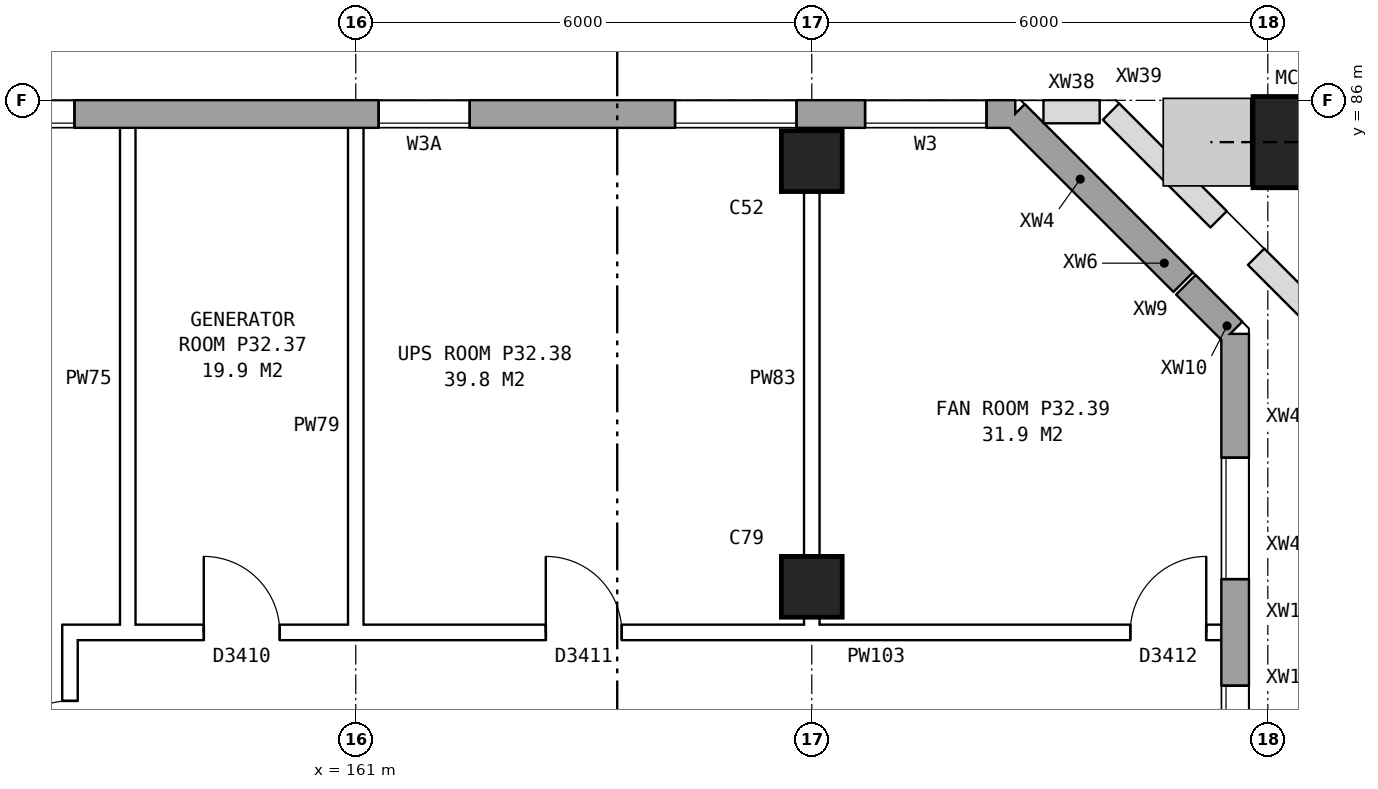
"""IFC4 building model, lengths in metres.
Left out: names, types, materials, properties, quantities, classifications, styles, units other than length and angle.
Written with IfcOpenShell. Run it as: python <this file> out.ifc"""

import sys

from ifc_helpers import new_model, si_unit, direction, frame, frame_2d, origin, origin_2d, place, context, subcontext, project, spatial, rectangle, hollow_rectangle, extrude, element, fill, save


model = new_model("IFC4")
c1 = context("Model", 3, precision=1e-05, world=origin(), true_north=direction((0.0, 1.0)))
c2 = subcontext(c1, "Body", "Model", "MODEL_VIEW")
j1 = project(units=[si_unit("LENGTHUNIT", "METRE"), si_unit("PLANEANGLEUNIT", "RADIAN")], contexts=[c1])
p1 = place(None, origin())
s1 = spatial("IfcSite", under=j1, at=p1, CompositionType="ELEMENT")
p2 = place(p1, origin())
s2 = spatial("IfcBuilding", under=s1, at=p2, CompositionType="ELEMENT")
p3 = place(p2, frame((0.0, 0.0, 115.0)))
s3 = spatial("IfcBuildingStorey", under=s2, at=p3, CompositionType="ELEMENT", Elevation=115.0)
for number, where, z_axis, x_axis in (
    (1, (167.0, 79.6, 0.0), (0.0, 0.0, 1.0), (1.0, 0.0, 0.0)),
    (2, (167.0, 85.2, 0.0), (0.0, 0.0, 1.0), (1.0, 0.0, 0.0)),
):
    element("IfcColumn", number, at=place(p3, frame(where, z_axis=z_axis, x_axis=x_axis)), inside=s3, PredefinedType="COLUMN", context=c2, shape_type="SweptSolid", body=[
        extrude(rectangle(XDim=0.8, YDim=0.8, at=origin_2d()), origin(), (0.0, 0.0, 1.0), 4.2),
    ])
p4 = place(p3, frame((173.406, 85.45, 0.161), z_axis=(-0.267672897269, 0.0, 0.963509844302), x_axis=(0.0, -1.0, 0.0)))
e3 = element("IfcColumn", 3, at=p4, inside=s3, PredefinedType="COLUMN", context=c2, shape_type="SweptSolid", body=[
    extrude(hollow_rectangle(XDim=1.2, YDim=1.2, WallThickness=0.065, at=origin_2d()), origin(), (0.0, 0.0, 1.0), 4.337),
])
p5 = place(p3, frame((172.57, 57.075, 0.0), z_axis=(0.0, 0.0, 1.0), x_axis=(0.0, 1.0, 0.0)))
e4 = element("IfcWall", 4, at=p5, inside=s3, PredefinedType="STANDARD", context=c2, shape_type="SweptSolid", body=[
    extrude(rectangle(XDim=25.851, YDim=0.36, at=frame_2d((12.925, 0.0))), origin(), (0.0, 0.0, 1.0), 4.2),
])
p6 = place(p5, frame((2.6, 0.0, 1.5)))
e5 = element("IfcOpeningElement", 5, at=p6, cuts=e4, PredefinedType="OPENING", context=c2, shape_type="SweptSolid", body=[
    extrude(rectangle(XDim=0.9, YDim=1.2, at=frame_2d((0.45, 0.6))), frame((0.0, 0.19, 0.0), z_axis=(0.0, -1.0, 0.0), x_axis=(1.0, 0.0, 0.0)), (0.0, 0.0, 1.0), 0.38),
])
p7 = place(p5, frame((3.925, 0.0, 1.5)))
e6 = element("IfcOpeningElement", 6, at=p7, cuts=e4, PredefinedType="OPENING", context=c2, shape_type="SweptSolid", body=[
    extrude(rectangle(XDim=0.6, YDim=1.2, at=frame_2d((0.3, 0.6))), frame((0.0, 0.19, 0.0), z_axis=(0.0, -1.0, 0.0), x_axis=(1.0, 0.0, 0.0)), (0.0, 0.0, 1.0), 0.38),
])
p8 = place(p5, frame((7.625, 0.0, 1.5)))
e7 = element("IfcOpeningElement", 7, at=p8, cuts=e4, PredefinedType="OPENING", context=c2, shape_type="SweptSolid", body=[
    extrude(rectangle(XDim=1.6, YDim=1.2, at=frame_2d((0.8, 0.6))), frame((0.0, 0.19, 0.0), z_axis=(0.0, -1.0, 0.0), x_axis=(1.0, 0.0, 0.0)), (0.0, 0.0, 1.0), 0.38),
])
p9 = place(p5, frame((10.625, 0.0, 1.5)))
e8 = element("IfcOpeningElement", 8, at=p9, cuts=e4, PredefinedType="OPENING", context=c2, shape_type="SweptSolid", body=[
    extrude(rectangle(XDim=1.6, YDim=1.2, at=frame_2d((0.8, 0.6))), frame((0.0, 0.19, 0.0), z_axis=(0.0, -1.0, 0.0), x_axis=(1.0, 0.0, 0.0)), (0.0, 0.0, 1.0), 0.38),
])
p10 = place(p5, frame((9.525, 0.0, 1.5)))
e9 = element("IfcOpeningElement", 9, at=p10, cuts=e4, PredefinedType="OPENING", context=c2, shape_type="SweptSolid", body=[
    extrude(rectangle(XDim=0.6, YDim=1.2, at=frame_2d((0.3, 0.6))), frame((0.0, 0.19, 0.0), z_axis=(0.0, -1.0, 0.0), x_axis=(1.0, 0.0, 0.0)), (0.0, 0.0, 1.0), 0.38),
])
p11 = place(p5, frame((14.975, 0.0, 1.5)))
e10 = element("IfcOpeningElement", 10, at=p11, cuts=e4, PredefinedType="OPENING", context=c2, shape_type="SweptSolid", body=[
    extrude(rectangle(XDim=0.6, YDim=1.2, at=frame_2d((0.3, 0.6))), frame((0.0, 0.19, 0.0), z_axis=(0.0, -1.0, 0.0), x_axis=(1.0, 0.0, 0.0)), (0.0, 0.0, 1.0), 0.38),
])
p12 = place(p5, frame((19.625, 0.0, 1.5)))
e11 = element("IfcOpeningElement", 11, at=p12, cuts=e4, PredefinedType="OPENING", context=c2, shape_type="SweptSolid", body=[
    extrude(rectangle(XDim=1.6, YDim=1.2, at=frame_2d((0.8, 0.6))), frame((0.0, 0.19, 0.0), z_axis=(0.0, -1.0, 0.0), x_axis=(1.0, 0.0, 0.0)), (0.0, 0.0, 1.0), 0.38),
])
p13 = place(p5, frame((22.625, 0.0, 1.5)))
e12 = element("IfcOpeningElement", 12, at=p13, cuts=e4, PredefinedType="OPENING", context=c2, shape_type="SweptSolid", body=[
    extrude(rectangle(XDim=1.6, YDim=1.2, at=frame_2d((0.8, 0.6))), frame((0.0, 0.19, 0.0), z_axis=(0.0, -1.0, 0.0), x_axis=(1.0, 0.0, 0.0)), (0.0, 0.0, 1.0), 0.38),
])
p14 = place(p5, frame((15.875, 0.0, 1.5)))
e13 = element("IfcOpeningElement", 13, at=p14, cuts=e4, PredefinedType="OPENING", context=c2, shape_type="SweptSolid", body=[
    extrude(rectangle(XDim=1.2, YDim=1.2, at=frame_2d((0.6, 0.6))), frame((0.0, 0.19, 0.0), z_axis=(0.0, -1.0, 0.0), x_axis=(1.0, 0.0, 0.0)), (0.0, 0.0, 1.0), 0.38),
])
p15 = place(p3, frame((172.535, 82.961, 0.0), z_axis=(0.0, 0.0, 1.0), x_axis=(-0.706503705369, 0.707709343092, 0.0)))
e14 = element("IfcWall", 14, at=p15, inside=s3, PredefinedType="STANDARD", context=c2, shape_type="SweptSolid", body=[
    extrude(rectangle(XDim=0.202, YDim=0.36, at=frame_2d((0.101, 0.0))), origin(), (0.0, 0.0, 1.0), 4.2),
])
p16 = place(p3, frame((172.392, 83.104, 0.953), z_axis=(0.0, 0.0, 1.0), x_axis=(-0.707291043531, 0.706922470814, 0.0)))
e15 = element("IfcWall", 15, at=p16, inside=s3, PredefinedType="STANDARD", context=c2, shape_type="SweptSolid", body=[
    extrude(rectangle(XDim=0.662, YDim=0.36, at=frame_2d((0.331, 0.0))), origin(), (0.0, 0.0, 1.0), 3.247),
])
p17 = place(p3, frame((171.886, 83.609, 0.0), z_axis=(0.0, 0.0, 1.0), x_axis=(-0.707106781187, 0.707106781187, 0.0)))
e16 = element("IfcWall", 16, at=p17, inside=s3, PredefinedType="STANDARD", context=c2, shape_type="SweptSolid", body=[
    extrude(rectangle(XDim=0.703, YDim=0.36, at=frame_2d((0.351, 0.0))), origin(), (0.0, 0.0, 1.0), 3.397),
])
p18 = place(p3, frame((171.389, 84.106, 0.0), z_axis=(0.0, 0.0, 1.0), x_axis=(-0.707106781187, 0.707106781187, 0.0)))
e17 = element("IfcWall", 17, at=p18, inside=s3, PredefinedType="STANDARD", context=c2, shape_type="SweptSolid", body=[
    extrude(rectangle(XDim=2.424, YDim=0.36, at=frame_2d((1.212, 0.0))), origin(), (0.0, 0.0, 1.0), 4.2),
])
p19 = place(p3, frame((169.675, 85.82, 0.0), z_axis=(0.0, 0.0, 1.0), x_axis=(-1.0, 0.0, 0.0)))
e18 = element("IfcWall", 18, at=p19, inside=s3, PredefinedType="STANDARD", context=c2, shape_type="SweptSolid", body=[
    extrude(rectangle(XDim=35.601, YDim=0.36, at=frame_2d((17.8, 0.0))), origin(), (0.0, 0.0, 1.0), 4.2),
])
p20 = place(p19, frame((0.375, 0.0, 1.5)))
e19 = element("IfcOpeningElement", 19, at=p20, cuts=e18, PredefinedType="OPENING", context=c2, shape_type="SweptSolid", body=[
    extrude(rectangle(XDim=1.6, YDim=1.2, at=frame_2d((0.8, 0.6))), frame((0.0, 0.19, 0.0), z_axis=(0.0, -1.0, 0.0), x_axis=(1.0, 0.0, 0.0)), (0.0, 0.0, 1.0), 0.38),
])
p21 = place(p19, frame((2.875, 0.0, 1.5)))
e20 = element("IfcOpeningElement", 20, at=p21, cuts=e18, PredefinedType="OPENING", context=c2, shape_type="SweptSolid", body=[
    extrude(rectangle(XDim=1.6, YDim=1.2, at=frame_2d((0.8, 0.6))), frame((0.0, 0.19, 0.0), z_axis=(0.0, -1.0, 0.0), x_axis=(1.0, 0.0, 0.0)), (0.0, 0.0, 1.0), 0.38),
])
p22 = place(p19, frame((7.175, 0.0, 1.5)))
e21 = element("IfcOpeningElement", 21, at=p22, cuts=e18, PredefinedType="OPENING", context=c2, shape_type="SweptSolid", body=[
    extrude(rectangle(XDim=1.2, YDim=1.2, at=frame_2d((0.6, 0.6))), frame((0.0, 0.19, 0.0), z_axis=(0.0, -1.0, 0.0), x_axis=(1.0, 0.0, 0.0)), (0.0, 0.0, 1.0), 0.38),
])
p23 = place(p19, frame((12.375, 0.0, 1.5)))
e22 = element("IfcOpeningElement", 22, at=p23, cuts=e18, PredefinedType="OPENING", context=c2, shape_type="SweptSolid", body=[
    extrude(rectangle(XDim=1.6, YDim=1.2, at=frame_2d((0.8, 0.6))), frame((0.0, 0.19, 0.0), z_axis=(0.0, -1.0, 0.0), x_axis=(1.0, 0.0, 0.0)), (0.0, 0.0, 1.0), 0.38),
])
p24 = place(p19, frame((14.275, 0.0, 1.5)))
e23 = element("IfcOpeningElement", 23, at=p24, cuts=e18, PredefinedType="OPENING", context=c2, shape_type="SweptSolid", body=[
    extrude(rectangle(XDim=0.6, YDim=1.2, at=frame_2d((0.3, 0.6))), frame((0.0, 0.19, 0.0), z_axis=(0.0, -1.0, 0.0), x_axis=(1.0, 0.0, 0.0)), (0.0, 0.0, 1.0), 0.38),
])
p25 = place(p19, frame((15.175, 0.0, 1.5)))
e24 = element("IfcOpeningElement", 24, at=p25, cuts=e18, PredefinedType="OPENING", context=c2, shape_type="SweptSolid", body=[
    extrude(rectangle(XDim=1.2, YDim=1.2, at=frame_2d((0.6, 0.6))), frame((0.0, 0.19, 0.0), z_axis=(0.0, -1.0, 0.0), x_axis=(1.0, 0.0, 0.0)), (0.0, 0.0, 1.0), 0.38),
])
p26 = place(p19, frame((24.375, 0.0, 1.5)))
e25 = element("IfcOpeningElement", 25, at=p26, cuts=e18, PredefinedType="OPENING", context=c2, shape_type="SweptSolid", body=[
    extrude(rectangle(XDim=1.6, YDim=1.2, at=frame_2d((0.8, 0.6))), frame((0.0, 0.19, 0.0), z_axis=(0.0, -1.0, 0.0), x_axis=(1.0, 0.0, 0.0)), (0.0, 0.0, 1.0), 0.38),
])
p27 = place(p19, frame((26.875, 0.0, 1.5)))
e26 = element("IfcOpeningElement", 26, at=p27, cuts=e18, PredefinedType="OPENING", context=c2, shape_type="SweptSolid", body=[
    extrude(rectangle(XDim=1.2, YDim=1.2, at=frame_2d((0.6, 0.6))), frame((0.0, 0.19, 0.0), z_axis=(0.0, -1.0, 0.0), x_axis=(1.0, 0.0, 0.0)), (0.0, 0.0, 1.0), 0.38),
])
p28 = place(p19, frame((31.075, 0.0, 1.5)))
e27 = element("IfcOpeningElement", 27, at=p28, cuts=e18, PredefinedType="OPENING", context=c2, shape_type="SweptSolid", body=[
    extrude(rectangle(XDim=1.2, YDim=1.2, at=frame_2d((0.6, 0.6))), frame((0.0, 0.19, 0.0), z_axis=(0.0, -1.0, 0.0), x_axis=(1.0, 0.0, 0.0)), (0.0, 0.0, 1.0), 0.38),
])
p29 = place(p19, frame((19.125, 0.0, 1.5)))
e28 = element("IfcOpeningElement", 28, at=p29, cuts=e18, PredefinedType="OPENING", context=c2, shape_type="SweptSolid", body=[
    extrude(rectangle(XDim=1.2, YDim=1.2, at=frame_2d((0.6, 0.6))), frame((0.0, 0.19, 0.0), z_axis=(0.0, -1.0, 0.0), x_axis=(1.0, 0.0, 0.0)), (0.0, 0.0, 1.0), 0.38),
])
p30 = place(p3, frame((173.742, 83.045, 0.0), z_axis=(0.0, 0.0, 1.0), x_axis=(-0.707010372874, 0.707203176357, 0.0)))
e29 = element("IfcWall", 29, at=p30, inside=s3, PredefinedType="PARAPET", context=c2, shape_type="SweptSolid", body=[
    extrude(rectangle(XDim=1.266, YDim=0.3, at=frame_2d((0.633, 0.0))), origin(), (0.0, 0.0, 1.0), 1.1),
])
p31 = place(p3, frame((172.351, 84.437, 0.0), z_axis=(0.0, 0.0, 1.0), x_axis=(-0.707045710514, 0.707167846585, 0.0)))
e30 = element("IfcWall", 30, at=p31, inside=s3, PredefinedType="PARAPET", context=c2, shape_type="SweptSolid", body=[
    extrude(rectangle(XDim=1.999, YDim=0.3, at=frame_2d((1.0, 0.0))), origin(), (0.0, 0.0, 1.0), 1.1),
])
p32 = place(p3, frame((170.786, 85.85, 0.0), z_axis=(0.0, 0.0, 1.0), x_axis=(-1.0, 0.0, 0.0)))
e31 = element("IfcWall", 31, at=p32, inside=s3, PredefinedType="PARAPET", context=c2, shape_type="SweptSolid", body=[
    extrude(rectangle(XDim=0.736, YDim=0.3, at=frame_2d((0.368, 0.0))), origin(), (0.0, 0.0, 1.0), 1.1),
])
p33 = place(p3, frame((157.14, 79.0, 0.0), z_axis=(0.0, 0.0, 1.0), x_axis=(1.0, 0.0, 0.0)))
e32 = element("IfcWall", 32, at=p33, inside=s3, PredefinedType="PARTITIONING", context=c2, shape_type="SweptSolid", body=[
    extrude(rectangle(XDim=15.37, YDim=0.2, at=frame_2d((7.685, 0.0))), origin(), (0.0, 0.0, 1.0), 4.2),
])
p34 = place(p33, frame((1.86, 0.0, 0.0)))
e33 = element("IfcOpeningElement", 33, at=p34, cuts=e32, PredefinedType="OPENING", context=c2, shape_type="SweptSolid", body=[
    extrude(rectangle(XDim=1.0, YDim=2.1, at=frame_2d((0.5, 1.05))), frame((0.0, 0.11, 0.0), z_axis=(0.0, -1.0, 0.0), x_axis=(1.0, 0.0, 0.0)), (0.0, 0.0, 1.0), 0.22),
])
p35 = place(p33, frame((6.36, 0.0, 0.0)))
e34 = element("IfcOpeningElement", 34, at=p35, cuts=e32, PredefinedType="OPENING", context=c2, shape_type="SweptSolid", body=[
    extrude(rectangle(XDim=1.0, YDim=2.1, at=frame_2d((0.5, 1.05))), frame((0.0, 0.11, 0.0), z_axis=(0.0, -1.0, 0.0), x_axis=(1.0, 0.0, 0.0)), (0.0, 0.0, 1.0), 0.22),
])
p36 = place(p33, frame((14.05, 0.0, 0.0)))
e35 = element("IfcOpeningElement", 35, at=p36, cuts=e32, PredefinedType="OPENING", context=c2, shape_type="SweptSolid", body=[
    extrude(rectangle(XDim=1.0, YDim=2.1, at=frame_2d((0.5, 1.05))), frame((0.0, 0.11, 0.0), z_axis=(0.0, -1.0, 0.0), x_axis=(1.0, 0.0, 0.0)), (0.0, 0.0, 1.0), 0.22),
])
p37 = place(p3, frame((157.24, 76.1, 0.0), z_axis=(0.0, 0.0, 1.0), x_axis=(0.0, 1.0, 0.0)))
e36 = element("IfcWall", 36, at=p37, inside=s3, PredefinedType="PARTITIONING", context=c2, shape_type="SweptSolid", body=[
    extrude(rectangle(XDim=3.0, YDim=0.2, at=frame_2d((1.5, 0.0))), origin(), (0.0, 0.0, 1.0), 4.2),
])
p38 = place(p37, frame((1.0, 0.0, 0.0)))
e37 = element("IfcOpeningElement", 37, at=p38, cuts=e36, PredefinedType="OPENING", context=c2, shape_type="SweptSolid", body=[
    extrude(rectangle(XDim=1.0, YDim=2.1, at=frame_2d((0.5, 1.05))), frame((0.0, 0.11, 0.0), z_axis=(0.0, -1.0, 0.0), x_axis=(1.0, 0.0, 0.0)), (0.0, 0.0, 1.0), 0.22),
])
for number, where, z_axis, x_axis in (
    (38, (158.0, 78.9, 0.0), (0.0, 0.0, 1.0), (0.0, 1.0, 0.0)),
    (39, (161.0, 78.9, 0.0), (0.0, 0.0, 1.0), (0.0, 1.0, 0.0)),
    (40, (167.0, 78.9, 0.0), (0.0, 0.0, 1.0), (0.0, 1.0, 0.0)),
):
    element("IfcWall", number, at=place(p3, frame(where, z_axis=z_axis, x_axis=x_axis)), inside=s3, PredefinedType="PARTITIONING", context=c2, shape_type="SweptSolid", body=[
        extrude(rectangle(XDim=6.86, YDim=0.2, at=frame_2d((3.43, 0.0))), origin(), (0.0, 0.0, 1.0), 4.2),
    ])
p39 = place(p12, origin())
e41 = element("IfcWindow", 41, at=p39, inside=s3, PartitioningType="DOUBLE_PANEL_HORIZONTAL", PredefinedType="WINDOW", context=c2, shape_type="SweptSolid", body=[
    extrude(rectangle(XDim=1.6, YDim=1.2, at=frame_2d((0.8, 0.6))), frame((0.0, 0.15, 0.0), z_axis=(0.0, -1.0, 0.0), x_axis=(1.0, 0.0, 0.0)), (0.0, 0.0, 1.0), 0.06),
])
fill(e11, e41)
p40 = place(p13, origin())
e42 = element("IfcWindow", 42, at=p40, inside=s3, PartitioningType="DOUBLE_PANEL_HORIZONTAL", PredefinedType="WINDOW", context=c2, shape_type="SweptSolid", body=[
    extrude(rectangle(XDim=1.6, YDim=1.2, at=frame_2d((0.8, 0.6))), frame((0.0, 0.15, 0.0), z_axis=(0.0, -1.0, 0.0), x_axis=(1.0, 0.0, 0.0)), (0.0, 0.0, 1.0), 0.06),
])
fill(e12, e42)
p41 = place(p20, origin())
e43 = element("IfcWindow", 43, at=p41, inside=s3, PartitioningType="DOUBLE_PANEL_HORIZONTAL", PredefinedType="WINDOW", context=c2, shape_type="SweptSolid", body=[
    extrude(rectangle(XDim=1.6, YDim=1.2, at=frame_2d((0.8, 0.6))), frame((0.0, 0.15, 0.0), z_axis=(0.0, -1.0, 0.0), x_axis=(1.0, 0.0, 0.0)), (0.0, 0.0, 1.0), 0.06),
])
fill(e19, e43)
p42 = place(p21, origin())
e44 = element("IfcWindow", 44, at=p42, inside=s3, PartitioningType="DOUBLE_PANEL_HORIZONTAL", PredefinedType="WINDOW", context=c2, shape_type="SweptSolid", body=[
    extrude(rectangle(XDim=1.6, YDim=1.2, at=frame_2d((0.8, 0.6))), frame((0.0, 0.15, 0.0), z_axis=(0.0, -1.0, 0.0), x_axis=(1.0, 0.0, 0.0)), (0.0, 0.0, 1.0), 0.06),
])
fill(e20, e44)
p43 = place(p22, origin())
e45 = element("IfcWindow", 45, at=p43, inside=s3, PartitioningType="DOUBLE_PANEL_HORIZONTAL", PredefinedType="WINDOW", context=c2, shape_type="SweptSolid", body=[
    extrude(rectangle(XDim=1.2, YDim=1.2, at=frame_2d((0.6, 0.6))), frame((0.0, 0.15, 0.0), z_axis=(0.0, -1.0, 0.0), x_axis=(1.0, 0.0, 0.0)), (0.0, 0.0, 1.0), 0.06),
])
fill(e21, e45)
p44 = place(p23, origin())
e46 = element("IfcWindow", 46, at=p44, inside=s3, PartitioningType="DOUBLE_PANEL_HORIZONTAL", PredefinedType="WINDOW", context=c2, shape_type="SweptSolid", body=[
    extrude(rectangle(XDim=1.6, YDim=1.2, at=frame_2d((0.8, 0.6))), frame((0.0, 0.15, 0.0), z_axis=(0.0, -1.0, 0.0), x_axis=(1.0, 0.0, 0.0)), (0.0, 0.0, 1.0), 0.06),
])
fill(e22, e46)
p45 = place(p34, origin())
e47 = element("IfcDoor", 47, at=p45, inside=s3, OperationType="SINGLE_SWING_LEFT", PredefinedType="DOOR", context=c2, shape_type="SweptSolid", body=[
    extrude(rectangle(XDim=1.0, YDim=2.1, at=frame_2d((0.5, 1.05))), frame((0.0, 0.025, 0.0), z_axis=(0.0, -1.0, 0.0), x_axis=(1.0, 0.0, 0.0)), (0.0, 0.0, 1.0), 0.05),
])
fill(e33, e47)
p46 = place(p35, origin())
e48 = element("IfcDoor", 48, at=p46, inside=s3, OperationType="SINGLE_SWING_LEFT", PredefinedType="DOOR", context=c2, shape_type="SweptSolid", body=[
    extrude(rectangle(XDim=1.0, YDim=2.1, at=frame_2d((0.5, 1.05))), frame((0.0, 0.025, 0.0), z_axis=(0.0, -1.0, 0.0), x_axis=(1.0, 0.0, 0.0)), (0.0, 0.0, 1.0), 0.05),
])
fill(e34, e48)
p47 = place(p36, origin())
e49 = element("IfcDoor", 49, at=p47, inside=s3, OperationType="SINGLE_SWING_RIGHT", PredefinedType="DOOR", context=c2, shape_type="SweptSolid", body=[
    extrude(rectangle(XDim=1.0, YDim=2.1, at=frame_2d((0.5, 1.05))), frame((0.0, 0.025, 0.0), z_axis=(0.0, -1.0, 0.0), x_axis=(1.0, 0.0, 0.0)), (0.0, 0.0, 1.0), 0.05),
])
fill(e35, e49)
p48 = place(p38, origin())
e50 = element("IfcDoor", 50, at=p48, inside=s3, OperationType="SINGLE_SWING_LEFT", PredefinedType="DOOR", context=c2, shape_type="SweptSolid", body=[
    extrude(rectangle(XDim=1.0, YDim=2.1, at=frame_2d((0.5, 1.05))), frame((0.0, 0.025, 0.0), z_axis=(0.0, -1.0, 0.0), x_axis=(1.0, 0.0, 0.0)), (0.0, 0.0, 1.0), 0.05),
])
fill(e37, e50)
save(model, sys.argv[1])
